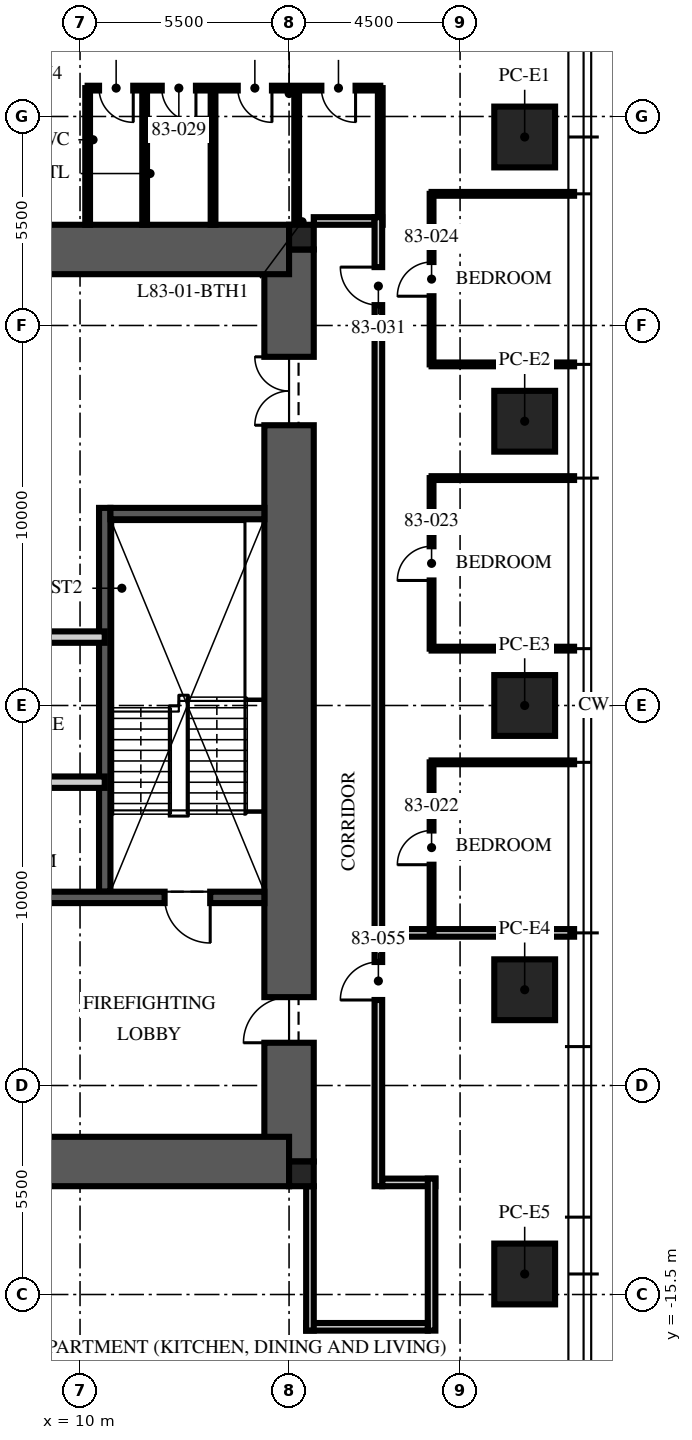
"""IFC4 building model, lengths in metres.
Left out: names, types, materials, properties, quantities, classifications, styles, units other than length and angle.
Written with IfcOpenShell. Run it as: python <this file> out.ifc"""

import sys

from ifc_helpers import new_model, si_unit, direction, frame, frame_2d, origin, origin_2d, place, context, subcontext, project, spatial, rectangle, extrude, element, fill, save


model = new_model("IFC4")
c1 = context("Model", 3, precision=1e-05, world=origin(), true_north=direction((0.0, 1.0)))
c2 = subcontext(c1, "Body", "Model", "MODEL_VIEW")
j1 = project(units=[si_unit("LENGTHUNIT", "METRE"), si_unit("PLANEANGLEUNIT", "RADIAN")], contexts=[c1])
p1 = place(None, origin())
s1 = spatial("IfcSite", under=j1, at=p1, CompositionType="ELEMENT")
p2 = place(p1, origin())
s2 = spatial("IfcBuilding", under=s1, at=p2, CompositionType="ELEMENT")
p3 = place(p2, frame((0.0, 0.0, 330.75)))
s3 = spatial("IfcBuildingStorey", under=s2, at=p3, CompositionType="ELEMENT", Elevation=330.75)
p4 = place(p3, frame((15.5, -12.0, -0.25), z_axis=(0.0, 0.0, 1.0), x_axis=(0.0, 1.0, 0.0)))
e1 = element("IfcWall", 1, at=p4, inside=s3, PredefinedType="SHEAR", context=c2, shape_type="SweptSolid", body=[
    extrude(rectangle(XDim=24.0, YDim=1.3, at=frame_2d((12.0, 0.0))), origin(), (0.0, 0.0, 1.0), 3.75),
])
p5 = place(p4, frame((3.125, 0.0, 0.25)))
e2 = element("IfcOpeningElement", 2, at=p5, cuts=e1, PredefinedType="OPENING", context=c2, shape_type="SweptSolid", body=[
    extrude(rectangle(XDim=1.2, YDim=2.1, at=frame_2d((0.6, 1.05))), frame((0.0, 0.66, 0.0), z_axis=(0.0, -1.0, 0.0), x_axis=(1.0, 0.0, 0.0)), (0.0, 0.0, 1.0), 1.32),
])
p6 = place(p4, frame((19.375, 0.0, 0.25)))
e3 = element("IfcOpeningElement", 3, at=p6, cuts=e1, PredefinedType="OPENING", context=c2, shape_type="SweptSolid", body=[
    extrude(rectangle(XDim=1.8, YDim=2.1, at=frame_2d((0.9, 1.05))), frame((0.0, 0.66, 0.0), z_axis=(0.0, -1.0, 0.0), x_axis=(1.0, 0.0, 0.0)), (0.0, 0.0, 1.0), 1.32),
])
for number, where, z_axis, x_axis in (
    (4, (-15.5, 12.0, -0.25), (0.0, 0.0, 1.0), (1.0, 0.0, 0.0)),
    (5, (-15.5, -12.0, -0.25), (0.0, 0.0, 1.0), (1.0, 0.0, 0.0)),
):
    element("IfcWall", number, at=place(p3, frame(where, z_axis=z_axis, x_axis=x_axis)), inside=s3, PredefinedType="SHEAR", context=c2, shape_type="SweptSolid", body=[
        extrude(rectangle(XDim=31.0, YDim=1.3, at=frame_2d((15.5, 0.0))), origin(), (0.0, 0.0, 1.0), 3.75),
    ])
for number, where, z_axis, x_axis in (
    (6, (15.825, 12.325, -0.25), (0.0, 0.0, 1.0), (1.0, 0.0, 0.0)),
    (7, (15.825, -12.325, -0.25), (0.0, 0.0, 1.0), (1.0, 0.0, 0.0)),
):
    element("IfcColumn", number, at=place(p3, frame(where, z_axis=z_axis, x_axis=x_axis)), inside=s3, PredefinedType="COLUMN", context=c2, shape_type="SweptSolid", body=[
        extrude(rectangle(XDim=0.65, YDim=0.65, at=origin_2d()), origin(), (0.0, 0.0, 1.0), 3.75),
    ])
for number, where, z_axis, x_axis in (
    (8, (21.7, 14.96, 0.0), (0.0, 0.0, 1.0), (0.0, 1.0, 0.0)),
    (9, (21.7, 7.48, 0.0), (0.0, 0.0, 1.0), (0.0, 1.0, 0.0)),
    (10, (21.7, 0.0, 0.0), (0.0, 0.0, 1.0), (0.0, 1.0, 0.0)),
    (11, (21.7, -7.48, 0.0), (0.0, 0.0, 1.0), (0.0, 1.0, 0.0)),
    (12, (21.7, -14.96, 0.0), (0.0, 0.0, 1.0), (0.0, 1.0, 0.0)),
):
    element("IfcColumn", number, at=place(p3, frame(where, z_axis=z_axis, x_axis=x_axis)), inside=s3, PredefinedType="COLUMN", context=c2, shape_type="SweptSolid", body=[
        extrude(rectangle(XDim=1.6, YDim=1.6, at=origin_2d()), origin(), (0.0, 0.0, 1.0), 3.75),
    ])
p7 = place(p3, frame((10.65, -4.9, 0.0), z_axis=(0.0, 0.0, 1.0), x_axis=(0.0, 1.0, 0.0)))
e13 = element("IfcWall", 13, at=p7, inside=s3, PredefinedType="SOLIDWALL", context=c2, shape_type="SweptSolid", body=[
    extrude(rectangle(XDim=10.1, YDim=0.3, at=frame_2d((5.05, 0.0))), origin(), (0.0, 0.0, 1.0), 3.5),
])
p8 = place(p3, frame((14.85, -5.05, 0.0), z_axis=(0.0, 0.0, 1.0), x_axis=(-1.0, 0.0, 0.0)))
e14 = element("IfcWall", 14, at=p8, inside=s3, PredefinedType="SOLIDWALL", context=c2, shape_type="SweptSolid", body=[
    extrude(rectangle(XDim=6.05, YDim=0.3, at=frame_2d((3.025, 0.0))), origin(), (0.0, 0.0, 1.0), 3.5),
])
p9 = place(p8, frame((1.425, 0.0, 0.0)))
e15 = element("IfcOpeningElement", 15, at=p9, cuts=e14, PredefinedType="OPENING", context=c2, shape_type="SweptSolid", body=[
    extrude(rectangle(XDim=1.2, YDim=2.1, at=frame_2d((0.6, 1.05))), frame((0.0, 0.16, 0.0), z_axis=(0.0, -1.0, 0.0), x_axis=(1.0, 0.0, 0.0)), (0.0, 0.0, 1.0), 0.32),
])
p10 = place(p3, frame((14.85, 5.05, 0.0), z_axis=(0.0, 0.0, 1.0), x_axis=(-1.0, 0.0, 0.0)))
e16 = element("IfcWall", 16, at=p10, inside=s3, PredefinedType="SOLIDWALL", context=c2, shape_type="SweptSolid", body=[
    extrude(rectangle(XDim=4.05, YDim=0.3, at=frame_2d((2.025, 0.0))), origin(), (0.0, 0.0, 1.0), 3.5),
])
p11 = place(p3, frame((-10.65, 1.8, 0.0), z_axis=(0.0, 0.0, 1.0), x_axis=(1.0, 0.0, 0.0)))
e17 = element("IfcWall", 17, at=p11, inside=s3, PredefinedType="PARTITIONING", context=c2, shape_type="SweptSolid", body=[
    extrude(rectangle(XDim=21.3, YDim=0.3, at=frame_2d((10.65, 0.0))), origin(), (0.0, 0.0, 1.0), 3.5),
])
p12 = place(p11, frame((10.05, 0.0, 0.0)))
e18 = element("IfcOpeningElement", 18, at=p12, cuts=e17, PredefinedType="OPENING", context=c2, shape_type="SweptSolid", body=[
    extrude(rectangle(XDim=1.2, YDim=2.1, at=frame_2d((0.6, 1.05))), frame((0.0, 0.16, 0.0), z_axis=(0.0, -1.0, 0.0), x_axis=(1.0, 0.0, 0.0)), (0.0, 0.0, 1.0), 0.32),
])
p13 = place(p11, frame((0.938, 0.0, 0.0)))
e19 = element("IfcOpeningElement", 19, at=p13, cuts=e17, PredefinedType="OPENING", context=c2, shape_type="SweptSolid", body=[
    extrude(rectangle(XDim=0.9, YDim=2.1, at=frame_2d((0.45, 1.05))), frame((0.0, 0.16, 0.0), z_axis=(0.0, -1.0, 0.0), x_axis=(1.0, 0.0, 0.0)), (0.0, 0.0, 1.0), 0.32),
])
p14 = place(p3, frame((10.65, -2.018, 0.0), z_axis=(0.0, 0.0, 1.0), x_axis=(-1.0, 0.0, 0.0)))
e20 = element("IfcWall", 20, at=p14, inside=s3, PredefinedType="PARTITIONING", context=c2, shape_type="SweptSolid", body=[
    extrude(rectangle(XDim=5.55, YDim=0.3, at=frame_2d((2.775, 0.0))), origin(), (0.0, 0.0, 1.0), 3.5),
])
p15 = place(p3, frame((17.95, -12.55, 0.0), z_axis=(0.0, 0.0, 1.0), x_axis=(1.0, 0.0, 0.0)))
e21 = element("IfcWall", 21, at=p15, inside=s3, PredefinedType="PARTITIONING", context=c2, shape_type="SweptSolid", body=[
    extrude(rectangle(XDim=1.4, YDim=0.2, at=frame_2d((0.7, 0.0))), origin(), (0.0, 0.0, 1.0), 3.5),
])
p16 = place(p3, frame((19.25, -12.45, 0.0), z_axis=(0.0, 0.0, 1.0), x_axis=(0.0, -1.0, 0.0)))
e22 = element("IfcWall", 22, at=p16, inside=s3, PredefinedType="PARTITIONING", context=c2, shape_type="SweptSolid", body=[
    extrude(rectangle(XDim=4.0, YDim=0.2, at=frame_2d((2.0, 0.0))), origin(), (0.0, 0.0, 1.0), 2.9),
])
p17 = place(p3, frame((19.15, -16.35, 0.0), z_axis=(0.0, 0.0, 1.0), x_axis=(-1.0, 0.0, 0.0)))
e23 = element("IfcWall", 23, at=p17, inside=s3, PredefinedType="PARTITIONING", context=c2, shape_type="SweptSolid", body=[
    extrude(rectangle(XDim=3.2, YDim=0.2, at=frame_2d((1.6, 0.0))), origin(), (0.0, 0.0, 1.0), 2.6),
])
p18 = place(p3, frame((16.05, -16.45, 0.0), z_axis=(0.0, 0.0, 1.0), x_axis=(0.0, 1.0, 0.0)))
e24 = element("IfcWall", 24, at=p18, inside=s3, PredefinedType="PARTITIONING", context=c2, shape_type="SweptSolid", body=[
    extrude(rectangle(XDim=3.8, YDim=0.2, at=frame_2d((1.9, 0.0))), origin(), (0.0, 0.0, 1.0), 2.6),
])
p19 = place(p3, frame((16.15, 12.75, 0.0), z_axis=(0.0, 0.0, 1.0), x_axis=(1.0, 0.0, 0.0)))
e25 = element("IfcWall", 25, at=p19, inside=s3, PredefinedType="PARTITIONING", context=c2, shape_type="SweptSolid", body=[
    extrude(rectangle(XDim=1.6, YDim=0.2, at=frame_2d((0.8, 0.0))), origin(), (0.0, 0.0, 1.0), 2.6),
])
p20 = place(p3, frame((17.95, -5.984, 0.0), z_axis=(0.0, 0.0, 1.0), x_axis=(1.0, 0.0, 0.0)))
e26 = element("IfcWall", 26, at=p20, inside=s3, PredefinedType="PARTITIONING", context=c2, shape_type="SweptSolid", body=[
    extrude(rectangle(XDim=5.05, YDim=0.2, at=frame_2d((2.525, 0.0))), origin(), (0.0, 0.0, 1.0), 3.01),
])
for number, where, z_axis, x_axis in (
    (27, (19.25, -1.496, 0.0), (0.0, 0.0, 1.0), (1.0, 0.0, 0.0)),
    (28, (19.25, 1.496, 0.0), (0.0, 0.0, 1.0), (1.0, 0.0, 0.0)),
    (29, (19.25, 5.984, 0.0), (0.0, 0.0, 1.0), (1.0, 0.0, 0.0)),
    (30, (19.25, 8.976, 0.0), (0.0, 0.0, 1.0), (1.0, 0.0, 0.0)),
    (31, (19.25, 13.464, 0.0), (0.0, 0.0, 1.0), (1.0, 0.0, 0.0)),
):
    element("IfcWall", number, at=place(p3, frame(where, z_axis=z_axis, x_axis=x_axis)), inside=s3, PredefinedType="PARTITIONING", context=c2, shape_type="SweptSolid", body=[
        extrude(rectangle(XDim=3.75, YDim=0.1, at=frame_2d((1.875, 0.0))), origin(), (0.0, 0.0, 1.0), 3.01),
    ])
p21 = place(p3, frame((19.25, -5.984, 0.0), z_axis=(0.0, 0.0, 1.0), x_axis=(0.0, 1.0, 0.0)))
e32 = element("IfcWall", 32, at=p21, inside=s3, PredefinedType="PARTITIONING", context=c2, shape_type="SweptSolid", body=[
    extrude(rectangle(XDim=4.488, YDim=0.1, at=frame_2d((2.244, 0.0))), origin(), (0.0, 0.0, 1.0), 2.91),
])
p22 = place(p21, frame((1.794, 0.0, 0.0)))
e33 = element("IfcOpeningElement", 33, at=p22, cuts=e32, PredefinedType="OPENING", context=c2, shape_type="SweptSolid", body=[
    extrude(rectangle(XDim=0.9, YDim=2.1, at=frame_2d((0.45, 1.05))), frame((0.0, 0.06, 0.0), z_axis=(0.0, -1.0, 0.0), x_axis=(1.0, 0.0, 0.0)), (0.0, 0.0, 1.0), 0.12),
])
p23 = place(p3, frame((19.25, 1.496, 0.0), z_axis=(0.0, 0.0, 1.0), x_axis=(0.0, 1.0, 0.0)))
e34 = element("IfcWall", 34, at=p23, inside=s3, PredefinedType="PARTITIONING", context=c2, shape_type="SweptSolid", body=[
    extrude(rectangle(XDim=4.488, YDim=0.1, at=frame_2d((2.244, 0.0))), origin(), (0.0, 0.0, 1.0), 2.91),
])
p24 = place(p23, frame((1.794, 0.0, 0.0)))
e35 = element("IfcOpeningElement", 35, at=p24, cuts=e34, PredefinedType="OPENING", context=c2, shape_type="SweptSolid", body=[
    extrude(rectangle(XDim=0.9, YDim=2.1, at=frame_2d((0.45, 1.05))), frame((0.0, 0.06, 0.0), z_axis=(0.0, -1.0, 0.0), x_axis=(1.0, 0.0, 0.0)), (0.0, 0.0, 1.0), 0.12),
])
p25 = place(p3, frame((19.25, 8.976, 0.0), z_axis=(0.0, 0.0, 1.0), x_axis=(0.0, 1.0, 0.0)))
e36 = element("IfcWall", 36, at=p25, inside=s3, PredefinedType="PARTITIONING", context=c2, shape_type="SweptSolid", body=[
    extrude(rectangle(XDim=4.488, YDim=0.1, at=frame_2d((2.244, 0.0))), origin(), (0.0, 0.0, 1.0), 2.91),
])
p26 = place(p25, frame((1.794, 0.0, 0.0)))
e37 = element("IfcOpeningElement", 37, at=p26, cuts=e36, PredefinedType="OPENING", context=c2, shape_type="SweptSolid", body=[
    extrude(rectangle(XDim=0.9, YDim=2.1, at=frame_2d((0.45, 1.05))), frame((0.0, 0.06, 0.0), z_axis=(0.0, -1.0, 0.0), x_axis=(1.0, 0.0, 0.0)), (0.0, 0.0, 1.0), 0.12),
])
p27 = place(p3, frame((17.9, 16.246, 0.0), z_axis=(0.0, 0.0, 1.0), x_axis=(-1.0, 0.0, 0.0)))
e38 = element("IfcWall", 38, at=p27, inside=s3, PredefinedType="PARTITIONING", context=c2, shape_type="SweptSolid", body=[
    extrude(rectangle(XDim=7.7, YDim=0.125, at=frame_2d((3.85, 0.0))), origin(), (0.0, 0.0, 1.0), 2.6),
])
p28 = place(p27, frame((0.65, 0.0, 0.0)))
e39 = element("IfcOpeningElement", 39, at=p28, cuts=e38, PredefinedType="OPENING", context=c2, shape_type="SweptSolid", body=[
    extrude(rectangle(XDim=0.9, YDim=2.1, at=frame_2d((0.45, 1.05))), frame((0.0, 0.073, 0.0), z_axis=(0.0, -1.0, 0.0), x_axis=(1.0, 0.0, 0.0)), (0.0, 0.0, 1.0), 0.145),
])
p29 = place(p27, frame((2.85, 0.0, 0.0)))
e40 = element("IfcOpeningElement", 40, at=p29, cuts=e38, PredefinedType="OPENING", context=c2, shape_type="SweptSolid", body=[
    extrude(rectangle(XDim=0.9, YDim=2.1, at=frame_2d((0.45, 1.05))), frame((0.0, 0.073, 0.0), z_axis=(0.0, -1.0, 0.0), x_axis=(1.0, 0.0, 0.0)), (0.0, 0.0, 1.0), 0.145),
])
p30 = place(p27, frame((4.85, 0.0, 0.0)))
e41 = element("IfcOpeningElement", 41, at=p30, cuts=e38, PredefinedType="OPENING", context=c2, shape_type="SweptSolid", body=[
    extrude(rectangle(XDim=0.9, YDim=2.1, at=frame_2d((0.45, 1.05))), frame((0.0, 0.073, 0.0), z_axis=(0.0, -1.0, 0.0), x_axis=(1.0, 0.0, 0.0)), (0.0, 0.0, 1.0), 0.145),
])
p31 = place(p27, frame((6.5, 0.0, 0.0)))
e42 = element("IfcOpeningElement", 42, at=p31, cuts=e38, PredefinedType="OPENING", context=c2, shape_type="SweptSolid", body=[
    extrude(rectangle(XDim=0.9, YDim=2.1, at=frame_2d((0.45, 1.05))), frame((0.0, 0.073, 0.0), z_axis=(0.0, -1.0, 0.0), x_axis=(1.0, 0.0, 0.0)), (0.0, 0.0, 1.0), 0.145),
])
for number, where, z_axis, x_axis in (
    (43, (17.9, 12.65, 0.0), (0.0, 0.0, 1.0), (0.0, 1.0, 0.0)),
    (44, (15.7, 12.65, 0.0), (0.0, 0.0, 1.0), (0.0, 1.0, 0.0)),
):
    element("IfcWall", number, at=place(p3, frame(where, z_axis=z_axis, x_axis=x_axis)), inside=s3, PredefinedType="PARTITIONING", context=c2, shape_type="SweptSolid", body=[
        extrude(rectangle(XDim=3.596, YDim=0.125, at=frame_2d((1.798, 0.0))), origin(), (0.0, 0.0, 1.0), 2.6),
    ])
for number, where, z_axis, x_axis in (
    (45, (13.5, 12.65, 0.0), (0.0, 0.0, 1.0), (0.0, 1.0, 0.0)),
    (46, (11.7, 12.65, 0.0), (0.0, 0.0, 1.0), (0.0, 1.0, 0.0)),
    (47, (10.2, 12.65, 0.0), (0.0, 0.0, 1.0), (0.0, 1.0, 0.0)),
):
    element("IfcWall", number, at=place(p3, frame(where, z_axis=z_axis, x_axis=x_axis)), inside=s3, PredefinedType="PARTITIONING", context=c2, shape_type="SweptSolid", body=[
        extrude(rectangle(XDim=3.596, YDim=0.125, at=frame_2d((1.798, 0.0))), origin(), (0.0, 0.0, 1.0), 3.5),
    ])
p32 = place(p3, frame((17.85, -12.65, 0.0), z_axis=(0.0, 0.0, 1.0), x_axis=(0.0, 1.0, 0.0)))
e48 = element("IfcWall", 48, at=p32, inside=s3, PredefinedType="PARTITIONING", context=c2, shape_type="SweptSolid", body=[
    extrude(rectangle(XDim=25.5, YDim=0.2, at=frame_2d((12.75, 0.0))), origin(), (0.0, 0.0, 1.0), 2.9),
])
p33 = place(p32, frame((23.186, 0.0, 0.0)))
e49 = element("IfcOpeningElement", 49, at=p33, cuts=e48, PredefinedType="OPENING", context=c2, shape_type="SweptSolid", body=[
    extrude(rectangle(XDim=1.0, YDim=2.2, at=frame_2d((0.5, 1.1))), frame((0.0, 0.11, 0.0), z_axis=(0.0, -1.0, 0.0), x_axis=(1.0, 0.0, 0.0)), (0.0, 0.0, 1.0), 0.22),
])
p34 = place(p32, frame((4.9, 0.0, 0.0)))
e50 = element("IfcOpeningElement", 50, at=p34, cuts=e48, PredefinedType="OPENING", context=c2, shape_type="SweptSolid", body=[
    extrude(rectangle(XDim=1.0, YDim=2.2, at=frame_2d((0.5, 1.1))), frame((0.0, 0.11, 0.0), z_axis=(0.0, -1.0, 0.0), x_axis=(1.0, 0.0, 0.0)), (0.0, 0.0, 1.0), 0.22),
])
p35 = place(p9, origin())
e51 = element("IfcDoor", 51, at=p35, inside=s3, OperationType="SINGLE_SWING_LEFT", PredefinedType="DOOR", context=c2, shape_type="SweptSolid", body=[
    extrude(rectangle(XDim=1.2, YDim=2.1, at=frame_2d((0.6, 1.05))), frame((0.0, 0.025, 0.0), z_axis=(0.0, -1.0, 0.0), x_axis=(1.0, 0.0, 0.0)), (0.0, 0.0, 1.0), 0.05),
])
fill(e15, e51)
p36 = place(p5, origin())
e52 = element("IfcDoor", 52, at=p36, inside=s3, OperationType="SINGLE_SWING_LEFT", PredefinedType="DOOR", context=c2, shape_type="SweptSolid", body=[
    extrude(rectangle(XDim=1.2, YDim=2.1, at=frame_2d((0.6, 1.05))), frame((0.0, 0.025, 0.0), z_axis=(0.0, -1.0, 0.0), x_axis=(1.0, 0.0, 0.0)), (0.0, 0.0, 1.0), 0.05),
])
fill(e2, e52)
p37 = place(p6, origin())
e53 = element("IfcDoor", 53, at=p37, inside=s3, OperationType="DOUBLE_DOOR_SINGLE_SWING", PredefinedType="DOOR", context=c2, shape_type="SweptSolid", body=[
    extrude(rectangle(XDim=1.8, YDim=2.1, at=frame_2d((0.9, 1.05))), frame((0.0, 0.025, 0.0), z_axis=(0.0, -1.0, 0.0), x_axis=(1.0, 0.0, 0.0)), (0.0, 0.0, 1.0), 0.05),
])
fill(e3, e53)
p38 = place(p22, origin())
e54 = element("IfcDoor", 54, at=p38, inside=s3, OperationType="SINGLE_SWING_LEFT", PredefinedType="DOOR", context=c2, shape_type="SweptSolid", body=[
    extrude(rectangle(XDim=0.9, YDim=2.1, at=frame_2d((0.45, 1.05))), frame((0.0, 0.025, 0.0), z_axis=(0.0, -1.0, 0.0), x_axis=(1.0, 0.0, 0.0)), (0.0, 0.0, 1.0), 0.05),
])
fill(e33, e54)
p39 = place(p24, origin())
e55 = element("IfcDoor", 55, at=p39, inside=s3, OperationType="SINGLE_SWING_LEFT", PredefinedType="DOOR", context=c2, shape_type="SweptSolid", body=[
    extrude(rectangle(XDim=0.9, YDim=2.1, at=frame_2d((0.45, 1.05))), frame((0.0, 0.025, 0.0), z_axis=(0.0, -1.0, 0.0), x_axis=(1.0, 0.0, 0.0)), (0.0, 0.0, 1.0), 0.05),
])
fill(e35, e55)
p40 = place(p26, origin())
e56 = element("IfcDoor", 56, at=p40, inside=s3, OperationType="SINGLE_SWING_LEFT", PredefinedType="DOOR", context=c2, shape_type="SweptSolid", body=[
    extrude(rectangle(XDim=0.9, YDim=2.1, at=frame_2d((0.45, 1.05))), frame((0.0, 0.025, 0.0), z_axis=(0.0, -1.0, 0.0), x_axis=(1.0, 0.0, 0.0)), (0.0, 0.0, 1.0), 0.05),
])
fill(e37, e56)
p41 = place(p28, origin())
e57 = element("IfcDoor", 57, at=p41, inside=s3, OperationType="SINGLE_SWING_LEFT", PredefinedType="DOOR", context=c2, shape_type="SweptSolid", body=[
    extrude(rectangle(XDim=0.9, YDim=2.1, at=frame_2d((0.45, 1.05))), frame((0.0, 0.025, 0.0), z_axis=(0.0, -1.0, 0.0), x_axis=(1.0, 0.0, 0.0)), (0.0, 0.0, 1.0), 0.05),
])
fill(e39, e57)
p42 = place(p29, origin())
e58 = element("IfcDoor", 58, at=p42, inside=s3, OperationType="SINGLE_SWING_LEFT", PredefinedType="DOOR", context=c2, shape_type="SweptSolid", body=[
    extrude(rectangle(XDim=0.9, YDim=2.1, at=frame_2d((0.45, 1.05))), frame((0.0, 0.025, 0.0), z_axis=(0.0, -1.0, 0.0), x_axis=(1.0, 0.0, 0.0)), (0.0, 0.0, 1.0), 0.05),
])
fill(e40, e58)
p43 = place(p30, origin())
e59 = element("IfcDoor", 59, at=p43, inside=s3, OperationType="SINGLE_SWING_LEFT", PredefinedType="DOOR", context=c2, shape_type="SweptSolid", body=[
    extrude(rectangle(XDim=0.9, YDim=2.1, at=frame_2d((0.45, 1.05))), frame((0.0, 0.025, 0.0), z_axis=(0.0, -1.0, 0.0), x_axis=(1.0, 0.0, 0.0)), (0.0, 0.0, 1.0), 0.05),
])
fill(e41, e59)
p44 = place(p31, origin())
e60 = element("IfcDoor", 60, at=p44, inside=s3, OperationType="SINGLE_SWING_LEFT", PredefinedType="DOOR", context=c2, shape_type="SweptSolid", body=[
    extrude(rectangle(XDim=0.9, YDim=2.1, at=frame_2d((0.45, 1.05))), frame((0.0, 0.025, 0.0), z_axis=(0.0, -1.0, 0.0), x_axis=(1.0, 0.0, 0.0)), (0.0, 0.0, 1.0), 0.05),
])
fill(e42, e60)
p45 = place(p33, origin())
e61 = element("IfcDoor", 61, at=p45, inside=s3, OperationType="SINGLE_SWING_RIGHT", PredefinedType="DOOR", context=c2, shape_type="SweptSolid", body=[
    extrude(rectangle(XDim=1.0, YDim=2.2, at=frame_2d((0.5, 1.1))), frame((0.0, 0.025, 0.0), z_axis=(0.0, -1.0, 0.0), x_axis=(1.0, 0.0, 0.0)), (0.0, 0.0, 1.0), 0.05),
])
fill(e49, e61)
p46 = place(p34, origin())
e62 = element("IfcDoor", 62, at=p46, inside=s3, OperationType="SINGLE_SWING_LEFT", PredefinedType="DOOR", context=c2, shape_type="SweptSolid", body=[
    extrude(rectangle(XDim=1.0, YDim=2.2, at=frame_2d((0.5, 1.1))), frame((0.0, 0.025, 0.0), z_axis=(0.0, -1.0, 0.0), x_axis=(1.0, 0.0, 0.0)), (0.0, 0.0, 1.0), 0.05),
])
fill(e50, e62)
save(model, sys.argv[1])
